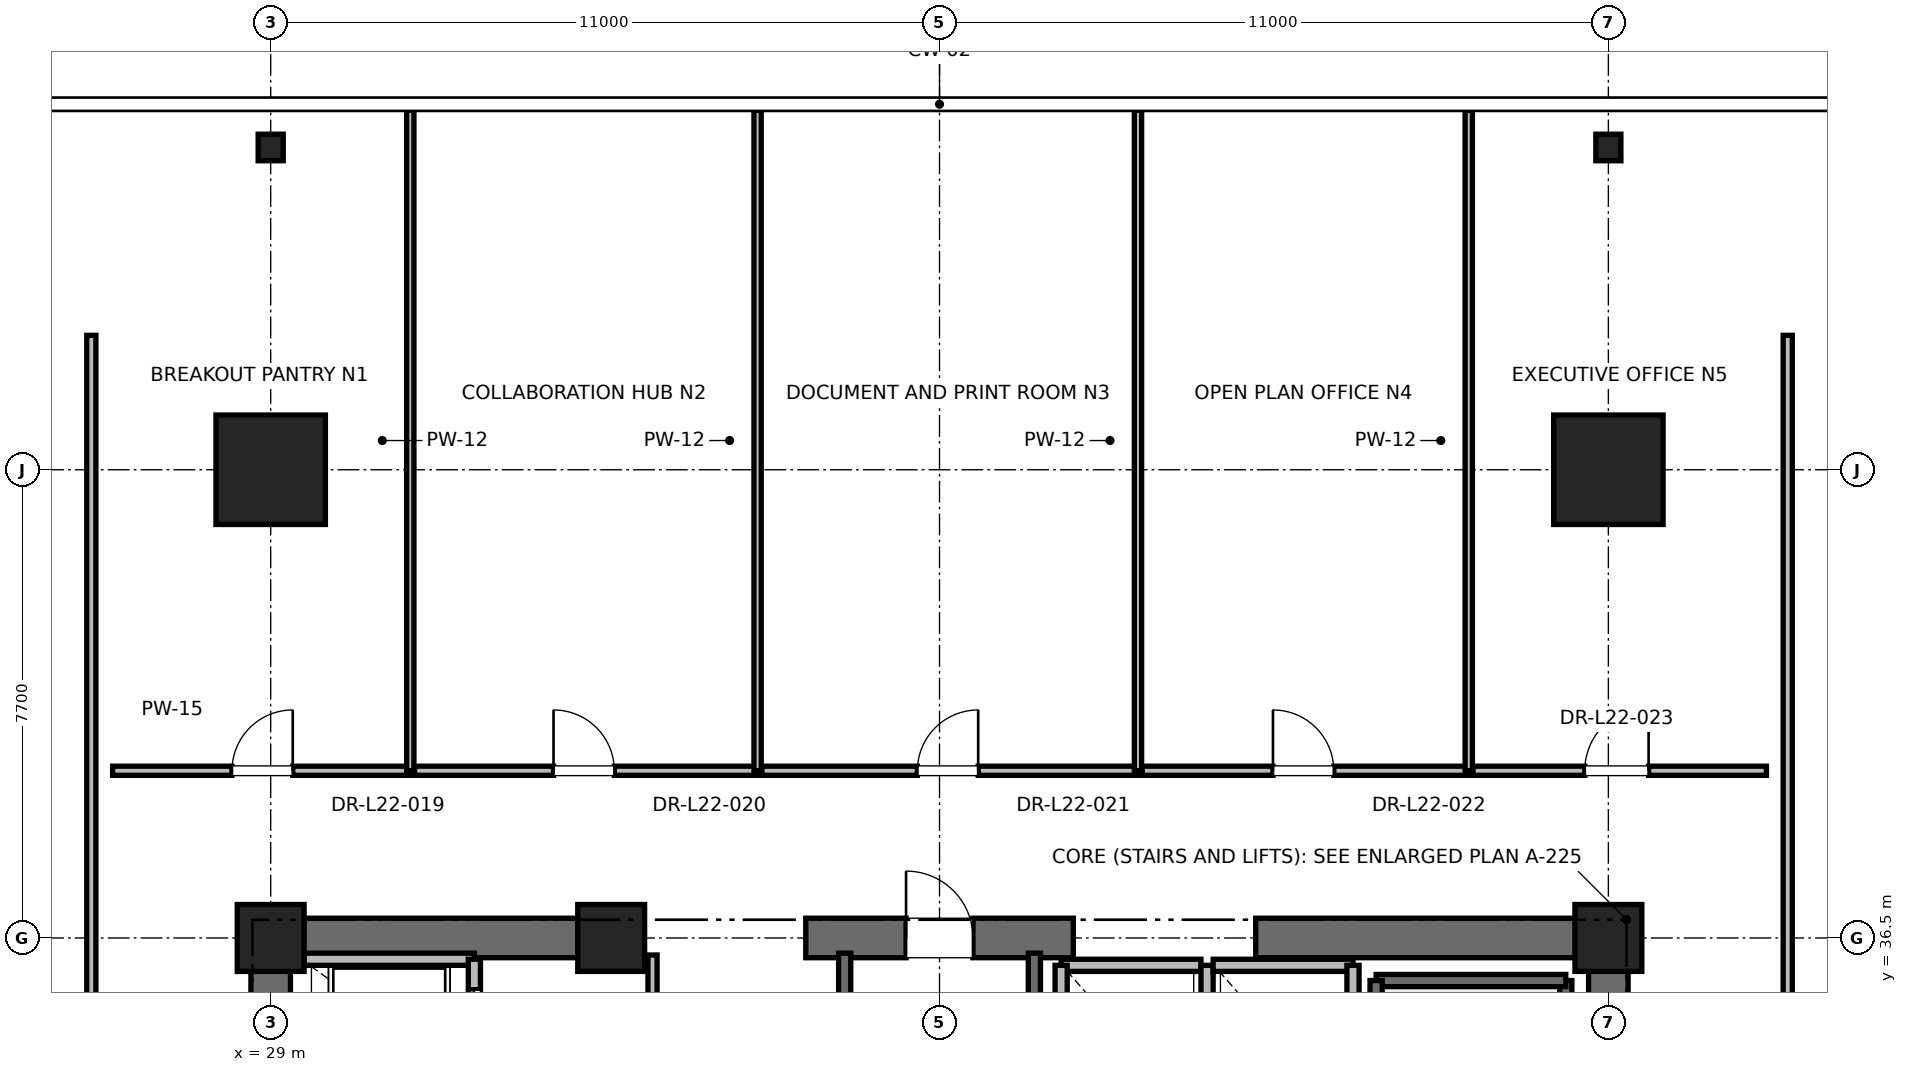
"""IFC4 building model, lengths in metres.
Left out: names, types, materials, properties, quantities, classifications, styles, units other than length and angle.
Written with IfcOpenShell. Run it as: python <this file> out.ifc"""

import sys

from ifc_helpers import new_model, si_unit, direction, frame, frame_2d, origin, origin_2d, place, context, subcontext, project, spatial, rectangle, i_section, extrude, element, fill, save


model = new_model("IFC4")
c1 = context("Model", 3, precision=1e-05, world=origin(), true_north=direction((0.0, 1.0)))
c2 = subcontext(c1, "Body", "Model", "MODEL_VIEW")
j1 = project(units=[si_unit("LENGTHUNIT", "METRE"), si_unit("PLANEANGLEUNIT", "RADIAN")], contexts=[c1])
p1 = place(None, origin())
s1 = spatial("IfcSite", under=j1, at=p1, CompositionType="ELEMENT")
p2 = place(p1, origin())
s2 = spatial("IfcBuilding", under=s1, at=p2, CompositionType="ELEMENT")
p3 = place(p2, frame((0.0, 0.0, 95.6)))
s3 = spatial("IfcBuildingStorey", under=s2, at=p3, CompositionType="ELEMENT", Elevation=95.6)
for number, where, z_axis, x_axis in (
    (1, (29.0, 44.2, 0.0), (0.0, 0.0, 1.0), (1.0, 0.0, 0.0)),
    (2, (51.0, 44.2, 0.0), (0.0, 0.0, 1.0), (1.0, 0.0, 0.0)),
):
    element("IfcColumn", number, at=place(p3, frame(where, z_axis=z_axis, x_axis=x_axis)), inside=s3, PredefinedType="COLUMN", context=c2, shape_type="SweptSolid", body=[
        extrude(rectangle(XDim=1.8, YDim=1.8, at=origin_2d()), origin(), (0.0, 0.0, 1.0), 4.0),
    ])
for number, where, z_axis, x_axis in (
    (3, (29.0, 49.5, 0.0), (0.0, 0.0, 1.0), (1.0, 0.0, 0.0)),
    (4, (51.0, 49.5, 0.0), (0.0, 0.0, 1.0), (1.0, 0.0, 0.0)),
):
    element("IfcColumn", number, at=place(p3, frame(where, z_axis=z_axis, x_axis=x_axis)), inside=s3, PredefinedType="COLUMN", context=c2, shape_type="SweptSolid", body=[
        extrude(i_section(OverallWidth=0.412, OverallDepth=0.437, WebThickness=0.036, FlangeThickness=0.058, FilletRadius=0.015, at=origin_2d()), origin(), (0.0, 0.0, 1.0), 4.0),
    ])
for number, where, z_axis, x_axis in (
    (5, (29.0, 36.5, 0.0), (0.0, 0.0, 1.0), (1.0, 0.0, 0.0)),
    (6, (51.0, 36.5, 0.0), (0.0, 0.0, 1.0), (1.0, 0.0, 0.0)),
    (7, (34.6, 36.5, 0.0), (0.0, 0.0, 1.0), (1.0, 0.0, 0.0)),
):
    element("IfcColumn", number, at=place(p3, frame(where, z_axis=z_axis, x_axis=x_axis)), inside=s3, PredefinedType="PILASTER", context=c2, shape_type="SweptSolid", body=[
        extrude(rectangle(XDim=1.1, YDim=1.1, at=origin_2d()), origin(), (0.0, 0.0, 1.0), 4.0),
    ])
p4 = place(p3, frame((29.0, 36.5, 0.0), z_axis=(0.0, 0.0, 1.0), x_axis=(1.0, 0.0, 0.0)))
e8 = element("IfcWall", 8, at=p4, inside=s3, PredefinedType="SHEAR", context=c2, shape_type="SweptSolid", body=[
    extrude(rectangle(XDim=5.8, YDim=0.65, at=frame_2d((2.9, 0.0))), origin(), (0.0, 0.0, 1.0), 3.76),
])
p5 = place(p3, frame((37.8, 36.5, 0.0), z_axis=(0.0, 0.0, 1.0), x_axis=(1.0, 0.0, 0.0)))
e9 = element("IfcWall", 9, at=p5, inside=s3, PredefinedType="SHEAR", context=c2, shape_type="SweptSolid", body=[
    extrude(rectangle(XDim=4.4, YDim=0.65, at=frame_2d((2.2, 0.0))), origin(), (0.0, 0.0, 1.0), 3.76),
])
p6 = place(p5, frame((1.65, 0.0, 0.0)))
e10 = element("IfcOpeningElement", 10, at=p6, cuts=e9, PredefinedType="OPENING", context=c2, shape_type="SweptSolid", body=[
    extrude(rectangle(XDim=1.1, YDim=2.15, at=frame_2d((0.55, 1.075))), frame((0.0, 0.325, 0.0), z_axis=(0.0, -1.0, 0.0), x_axis=(1.0, 0.0, 0.0)), (0.0, 0.0, 1.0), 0.65),
])
for number, where, z_axis, x_axis in (
    (11, (45.2, 36.5, 0.0), (0.0, 0.0, 1.0), (1.0, 0.0, 0.0)),
    (12, (29.0, 30.7, 0.0), (0.0, 0.0, 1.0), (0.0, 1.0, 0.0)),
):
    element("IfcWall", number, at=place(p3, frame(where, z_axis=z_axis, x_axis=x_axis)), inside=s3, PredefinedType="SHEAR", context=c2, shape_type="SweptSolid", body=[
        extrude(rectangle(XDim=5.8, YDim=0.65, at=frame_2d((2.9, 0.0))), origin(), (0.0, 0.0, 1.0), 3.76),
    ])
p7 = place(p3, frame((51.0, 27.7, 0.0), z_axis=(0.0, 0.0, 1.0), x_axis=(0.0, 1.0, 0.0)))
e13 = element("IfcWall", 13, at=p7, inside=s3, PredefinedType="SHEAR", context=c2, shape_type="SweptSolid", body=[
    extrude(rectangle(XDim=8.8, YDim=0.65, at=frame_2d((4.4, 0.0))), origin(), (0.0, 0.0, 1.0), 3.76),
])
p8 = place(p3, frame((50.3, 27.65, 0.0), z_axis=(0.0, 0.0, 1.0), x_axis=(0.0, 1.0, 0.0)))
e14 = element("IfcWall", 14, at=p8, inside=s3, PredefinedType="SOLIDWALL", context=c2, shape_type="SweptSolid", body=[
    extrude(rectangle(XDim=8.15, YDim=0.2, at=frame_2d((4.075, 0.0))), origin(), (0.0, 0.0, 1.0), 3.76),
])
p9 = place(p3, frame((47.18, 35.8, 0.0), z_axis=(0.0, 0.0, 1.0), x_axis=(1.0, 0.0, 0.0)))
e15 = element("IfcWall", 15, at=p9, inside=s3, PredefinedType="SOLIDWALL", context=c2, shape_type="SweptSolid", body=[
    extrude(rectangle(XDim=3.12, YDim=0.2, at=frame_2d((1.56, 0.0))), origin(), (0.0, 0.0, 1.0), 3.76),
])
p10 = place(p3, frame((47.18, 27.62, 0.0), z_axis=(0.0, 0.0, 1.0), x_axis=(0.0, 1.0, 0.0)))
e16 = element("IfcWall", 16, at=p10, inside=s3, PredefinedType="SOLIDWALL", context=c2, shape_type="SweptSolid", body=[
    extrude(rectangle(XDim=8.18, YDim=0.2, at=frame_2d((4.09, 0.0))), origin(), (0.0, 0.0, 1.0), 3.76),
])
p11 = place(p3, frame((38.44, 27.38, 0.0), z_axis=(0.0, 0.0, 1.0), x_axis=(0.0, 1.0, 0.0)))
e17 = element("IfcWall", 17, at=p11, inside=s3, PredefinedType="SOLIDWALL", context=c2, shape_type="SweptSolid", body=[
    extrude(rectangle(XDim=8.87, YDim=0.2, at=frame_2d((4.435, 0.0))), origin(), (0.0, 0.0, 1.0), 3.76),
])
p12 = place(p3, frame((41.56, 27.68, 0.0), z_axis=(0.0, 0.0, 1.0), x_axis=(0.0, 1.0, 0.0)))
e18 = element("IfcWall", 18, at=p12, inside=s3, PredefinedType="SOLIDWALL", context=c2, shape_type="SweptSolid", body=[
    extrude(rectangle(XDim=8.57, YDim=0.2, at=frame_2d((4.285, 0.0))), origin(), (0.0, 0.0, 1.0), 3.76),
])
p13 = place(p3, frame((32.35, 36.15, 0.0), z_axis=(0.0, 0.0, 1.0), x_axis=(-1.0, 0.0, 0.0)))
e19 = element("IfcWall", 19, at=p13, inside=s3, PredefinedType="SOLIDWALL", context=c2, shape_type="SweptSolid", body=[
    extrude(rectangle(XDim=2.8, YDim=0.2, at=frame_2d((1.4, 0.0))), origin(), (0.0, 0.0, 1.0), 2.889),
])
p14 = place(p3, frame((32.35, 34.05, 0.0), z_axis=(0.0, 0.0, 1.0), x_axis=(0.0, 1.0, 0.0)))
e20 = element("IfcWall", 20, at=p14, inside=s3, PredefinedType="SOLIDWALL", context=c2, shape_type="SweptSolid", body=[
    extrude(rectangle(XDim=2.1, YDim=0.2, at=frame_2d((1.05, 0.0))), origin(), (0.0, 0.0, 1.0), 3.76),
])
p15 = place(p14, frame((0.5, 0.0, 0.0)))
e21 = element("IfcOpeningElement", 21, at=p15, cuts=e20, PredefinedType="OPENING", context=c2, shape_type="SweptSolid", body=[
    extrude(rectangle(XDim=1.1, YDim=2.2, at=frame_2d((0.55, 1.1))), frame((0.0, 0.1, 0.0), z_axis=(0.0, -1.0, 0.0), x_axis=(1.0, 0.0, 0.0)), (0.0, 0.0, 1.0), 0.2),
])
p16 = place(p3, frame((44.3, 36.05, 0.0), z_axis=(0.0, 0.0, 1.0), x_axis=(-1.0, 0.0, 0.0)))
e22 = element("IfcWall", 22, at=p16, inside=s3, PredefinedType="SOLIDWALL", context=c2, shape_type="SweptSolid", body=[
    extrude(rectangle(XDim=2.3, YDim=0.2, at=frame_2d((1.15, 0.0))), origin(), (0.0, 0.0, 1.0), 2.54),
])
for number, where, z_axis, x_axis in (
    (23, (42.0, 36.05, 0.0), (0.0, 0.0, 1.0), (0.0, -1.0, 0.0)),
    (24, (44.4, 33.45, 0.0), (0.0, 0.0, 1.0), (0.0, 1.0, 0.0)),
):
    element("IfcWall", number, at=place(p3, frame(where, z_axis=z_axis, x_axis=x_axis)), inside=s3, PredefinedType="SOLIDWALL", context=c2, shape_type="SweptSolid", body=[
        extrude(rectangle(XDim=2.6, YDim=0.2, at=frame_2d((1.3, 0.0))), origin(), (0.0, 0.0, 1.0), 2.54),
    ])
p17 = place(p3, frame((46.8, 36.05, 0.0), z_axis=(0.0, 0.0, 1.0), x_axis=(-1.0, 0.0, 0.0)))
e25 = element("IfcWall", 25, at=p17, inside=s3, PredefinedType="SOLIDWALL", context=c2, shape_type="SweptSolid", body=[
    extrude(rectangle(XDim=2.3, YDim=0.2, at=frame_2d((1.15, 0.0))), origin(), (0.0, 0.0, 1.0), 2.54),
])
p18 = place(p3, frame((46.8, 33.45, 0.0), z_axis=(0.0, 0.0, 1.0), x_axis=(0.0, 1.0, 0.0)))
e26 = element("IfcWall", 26, at=p18, inside=s3, PredefinedType="SOLIDWALL", context=c2, shape_type="SweptSolid", body=[
    extrude(rectangle(XDim=2.6, YDim=0.2, at=frame_2d((1.3, 0.0))), origin(), (0.0, 0.0, 1.0), 3.76),
])
p19 = place(p3, frame((35.28, 33.95, 0.0), z_axis=(0.0, 0.0, 1.0), x_axis=(0.0, 1.0, 0.0)))
e27 = element("IfcWall", 27, at=p19, inside=s3, PredefinedType="PARTITIONING", context=c2, shape_type="SweptSolid", body=[
    extrude(rectangle(XDim=2.27, YDim=0.15, at=frame_2d((1.135, 0.0))), origin(), (0.0, 0.0, 1.0), 2.54),
])
p20 = place(p19, frame((0.66, 0.0, 0.0)))
e28 = element("IfcOpeningElement", 28, at=p20, cuts=e27, PredefinedType="OPENING", context=c2, shape_type="SweptSolid", body=[
    extrude(rectangle(XDim=0.95, YDim=2.15, at=frame_2d((0.475, 1.075))), frame((0.0, 0.075, 0.0), z_axis=(0.0, -1.0, 0.0), x_axis=(1.0, 0.0, 0.0)), (0.0, 0.0, 1.0), 0.15),
])
p21 = place(p3, frame((26.4, 39.25, 0.0), z_axis=(0.0, 0.0, 1.0), x_axis=(1.0, 0.0, 0.0)))
e29 = element("IfcWall", 29, at=p21, inside=s3, PredefinedType="PARTITIONING", context=c2, shape_type="SweptSolid", body=[
    extrude(rectangle(XDim=4.896, YDim=0.15, at=frame_2d((2.448, 0.0))), origin(), (0.0, 0.0, 1.0), 2.85),
])
p22 = place(p21, frame((1.963, 0.0, 0.0)))
e30 = element("IfcOpeningElement", 30, at=p22, cuts=e29, PredefinedType="OPENING", context=c2, shape_type="SweptSolid", body=[
    extrude(rectangle(XDim=1.0, YDim=2.15, at=frame_2d((0.5, 1.075))), frame((0.0, 0.075, 0.0), z_axis=(0.0, -1.0, 0.0), x_axis=(1.0, 0.0, 0.0)), (0.0, 0.0, 1.0), 0.15),
])
p23 = place(p3, frame((31.296, 39.25, 0.0), z_axis=(0.0, 0.0, 1.0), x_axis=(0.0, 1.0, 0.0)))
e31 = element("IfcWall", 31, at=p23, inside=s3, PredefinedType="PARTITIONING", context=c2, shape_type="SweptSolid", body=[
    extrude(rectangle(XDim=10.861, YDim=0.12, at=frame_2d((5.43, 0.0))), origin(), (0.0, 0.0, 1.0), 2.39),
])
p24 = place(p3, frame((31.366, 39.25, 0.0), z_axis=(0.0, 0.0, 1.0), x_axis=(1.0, 0.0, 0.0)))
e32 = element("IfcWall", 32, at=p24, inside=s3, PredefinedType="PARTITIONING", context=c2, shape_type="SweptSolid", body=[
    extrude(rectangle(XDim=5.642, YDim=0.15, at=frame_2d((2.821, 0.0))), origin(), (0.0, 0.0, 1.0), 2.85),
])
p25 = place(p24, frame((2.286, 0.0, 0.0)))
e33 = element("IfcOpeningElement", 33, at=p25, cuts=e32, PredefinedType="OPENING", context=c2, shape_type="SweptSolid", body=[
    extrude(rectangle(XDim=1.0, YDim=2.15, at=frame_2d((0.5, 1.075))), frame((0.0, 0.075, 0.0), z_axis=(0.0, -1.0, 0.0), x_axis=(1.0, 0.0, 0.0)), (0.0, 0.0, 1.0), 0.15),
])
p26 = place(p3, frame((37.008, 39.25, 0.0), z_axis=(0.0, 0.0, 1.0), x_axis=(0.0, 1.0, 0.0)))
e34 = element("IfcWall", 34, at=p26, inside=s3, PredefinedType="PARTITIONING", context=c2, shape_type="SweptSolid", body=[
    extrude(rectangle(XDim=10.861, YDim=0.12, at=frame_2d((5.43, 0.0))), origin(), (0.0, 0.0, 1.0), 2.39),
])
p27 = place(p3, frame((37.078, 39.25, 0.0), z_axis=(0.0, 0.0, 1.0), x_axis=(1.0, 0.0, 0.0)))
e35 = element("IfcWall", 35, at=p27, inside=s3, PredefinedType="PARTITIONING", context=c2, shape_type="SweptSolid", body=[
    extrude(rectangle(XDim=6.186, YDim=0.15, at=frame_2d((3.093, 0.0))), origin(), (0.0, 0.0, 1.0), 2.85),
])
p28 = place(p27, frame((2.558, 0.0, 0.0)))
e36 = element("IfcOpeningElement", 36, at=p28, cuts=e35, PredefinedType="OPENING", context=c2, shape_type="SweptSolid", body=[
    extrude(rectangle(XDim=1.0, YDim=2.15, at=frame_2d((0.5, 1.075))), frame((0.0, 0.075, 0.0), z_axis=(0.0, -1.0, 0.0), x_axis=(1.0, 0.0, 0.0)), (0.0, 0.0, 1.0), 0.15),
])
p29 = place(p3, frame((43.264, 39.25, 0.0), z_axis=(0.0, 0.0, 1.0), x_axis=(0.0, 1.0, 0.0)))
e37 = element("IfcWall", 37, at=p29, inside=s3, PredefinedType="PARTITIONING", context=c2, shape_type="SweptSolid", body=[
    extrude(rectangle(XDim=10.861, YDim=0.12, at=frame_2d((5.43, 0.0))), origin(), (0.0, 0.0, 1.0), 2.39),
])
p30 = place(p3, frame((43.334, 39.25, 0.0), z_axis=(0.0, 0.0, 1.0), x_axis=(1.0, 0.0, 0.0)))
e38 = element("IfcWall", 38, at=p30, inside=s3, PredefinedType="PARTITIONING", context=c2, shape_type="SweptSolid", body=[
    extrude(rectangle(XDim=5.37, YDim=0.15, at=frame_2d((2.685, 0.0))), origin(), (0.0, 0.0, 1.0), 2.85),
])
p31 = place(p30, frame((2.15, 0.0, 0.0)))
e39 = element("IfcOpeningElement", 39, at=p31, cuts=e38, PredefinedType="OPENING", context=c2, shape_type="SweptSolid", body=[
    extrude(rectangle(XDim=1.0, YDim=2.15, at=frame_2d((0.5, 1.075))), frame((0.0, 0.075, 0.0), z_axis=(0.0, -1.0, 0.0), x_axis=(1.0, 0.0, 0.0)), (0.0, 0.0, 1.0), 0.15),
])
p32 = place(p3, frame((48.704, 39.25, 0.0), z_axis=(0.0, 0.0, 1.0), x_axis=(0.0, 1.0, 0.0)))
e40 = element("IfcWall", 40, at=p32, inside=s3, PredefinedType="PARTITIONING", context=c2, shape_type="SweptSolid", body=[
    extrude(rectangle(XDim=10.861, YDim=0.12, at=frame_2d((5.43, 0.0))), origin(), (0.0, 0.0, 1.0), 2.39),
])
p33 = place(p3, frame((48.774, 39.25, 0.0), z_axis=(0.0, 0.0, 1.0), x_axis=(1.0, 0.0, 0.0)))
e41 = element("IfcWall", 41, at=p33, inside=s3, PredefinedType="PARTITIONING", context=c2, shape_type="SweptSolid", body=[
    extrude(rectangle(XDim=4.826, YDim=0.15, at=frame_2d((2.413, 0.0))), origin(), (0.0, 0.0, 1.0), 2.85),
])
p34 = place(p33, frame((1.838, 0.0, 0.0)))
e42 = element("IfcOpeningElement", 42, at=p34, cuts=e41, PredefinedType="OPENING", context=c2, shape_type="SweptSolid", body=[
    extrude(rectangle(XDim=1.05, YDim=2.2, at=frame_2d((0.525, 1.1))), frame((0.0, 0.075, 0.0), z_axis=(0.0, -1.0, 0.0), x_axis=(1.0, 0.0, 0.0)), (0.0, 0.0, 1.0), 0.15),
])
p35 = place(p3, frame((26.05, 24.544, 0.0), z_axis=(0.0, 0.0, 1.0), x_axis=(0.0, 1.0, 0.0)))
e43 = element("IfcWall", 43, at=p35, inside=s3, PredefinedType="PARTITIONING", context=c2, shape_type="SweptSolid", body=[
    extrude(rectangle(XDim=21.867, YDim=0.15, at=frame_2d((10.933, 0.0))), origin(), (0.0, 0.0, 1.0), 2.85),
])
p36 = place(p35, frame((5.428, 0.0, 0.0)))
e44 = element("IfcOpeningElement", 44, at=p36, cuts=e43, PredefinedType="OPENING", context=c2, shape_type="SweptSolid", body=[
    extrude(rectangle(XDim=1.0, YDim=2.15, at=frame_2d((0.5, 1.075))), frame((0.0, 0.075, 0.0), z_axis=(0.0, -1.0, 0.0), x_axis=(1.0, 0.0, 0.0)), (0.0, 0.0, 1.0), 0.15),
])
p37 = place(p3, frame((53.95, 30.596, 0.0), z_axis=(0.0, 0.0, 1.0), x_axis=(0.0, 1.0, 0.0)))
e45 = element("IfcWall", 45, at=p37, inside=s3, PredefinedType="PARTITIONING", context=c2, shape_type="SweptSolid", body=[
    extrude(rectangle(XDim=15.815, YDim=0.15, at=frame_2d((7.908, 0.0))), origin(), (0.0, 0.0, 1.0), 2.85),
])
p38 = place(p37, frame((2.402, 0.0, 0.0)))
e46 = element("IfcOpeningElement", 46, at=p38, cuts=e45, PredefinedType="OPENING", context=c2, shape_type="SweptSolid", body=[
    extrude(rectangle(XDim=1.0, YDim=2.15, at=frame_2d((0.5, 1.075))), frame((0.0, 0.075, 0.0), z_axis=(0.0, -1.0, 0.0), x_axis=(1.0, 0.0, 0.0)), (0.0, 0.0, 1.0), 0.15),
])
p39 = place(p6, origin())
e47 = element("IfcDoor", 47, at=p39, inside=s3, OperationType="SINGLE_SWING_LEFT", PredefinedType="DOOR", context=c2, shape_type="SweptSolid", body=[
    extrude(rectangle(XDim=1.1, YDim=2.15, at=frame_2d((0.55, 1.075))), frame((0.0, 0.025, 0.0), z_axis=(0.0, -1.0, 0.0), x_axis=(1.0, 0.0, 0.0)), (0.0, 0.0, 1.0), 0.05),
])
fill(e10, e47)
p40 = place(p15, origin())
e48 = element("IfcDoor", 48, at=p40, inside=s3, OperationType="SLIDING_TO_RIGHT", PredefinedType="DOOR", context=c2, shape_type="SweptSolid", body=[
    extrude(rectangle(XDim=1.1, YDim=2.2, at=frame_2d((0.55, 1.1))), frame((0.0, 0.025, 0.0), z_axis=(0.0, -1.0, 0.0), x_axis=(1.0, 0.0, 0.0)), (0.0, 0.0, 1.0), 0.05),
])
fill(e21, e48)
p41 = place(p22, origin())
e49 = element("IfcDoor", 49, at=p41, inside=s3, OperationType="SINGLE_SWING_RIGHT", PredefinedType="DOOR", context=c2, shape_type="SweptSolid", body=[
    extrude(rectangle(XDim=1.0, YDim=2.15, at=frame_2d((0.5, 1.075))), frame((0.0, 0.025, 0.0), z_axis=(0.0, -1.0, 0.0), x_axis=(1.0, 0.0, 0.0)), (0.0, 0.0, 1.0), 0.05),
])
fill(e30, e49)
p42 = place(p25, origin())
e50 = element("IfcDoor", 50, at=p42, inside=s3, OperationType="SINGLE_SWING_LEFT", PredefinedType="DOOR", context=c2, shape_type="SweptSolid", body=[
    extrude(rectangle(XDim=1.0, YDim=2.15, at=frame_2d((0.5, 1.075))), frame((0.0, 0.025, 0.0), z_axis=(0.0, -1.0, 0.0), x_axis=(1.0, 0.0, 0.0)), (0.0, 0.0, 1.0), 0.05),
])
fill(e33, e50)
p43 = place(p28, origin())
e51 = element("IfcDoor", 51, at=p43, inside=s3, OperationType="SINGLE_SWING_RIGHT", PredefinedType="DOOR", context=c2, shape_type="SweptSolid", body=[
    extrude(rectangle(XDim=1.0, YDim=2.15, at=frame_2d((0.5, 1.075))), frame((0.0, 0.025, 0.0), z_axis=(0.0, -1.0, 0.0), x_axis=(1.0, 0.0, 0.0)), (0.0, 0.0, 1.0), 0.05),
])
fill(e36, e51)
p44 = place(p31, origin())
e52 = element("IfcDoor", 52, at=p44, inside=s3, OperationType="SINGLE_SWING_LEFT", PredefinedType="DOOR", context=c2, shape_type="SweptSolid", body=[
    extrude(rectangle(XDim=1.0, YDim=2.15, at=frame_2d((0.5, 1.075))), frame((0.0, 0.025, 0.0), z_axis=(0.0, -1.0, 0.0), x_axis=(1.0, 0.0, 0.0)), (0.0, 0.0, 1.0), 0.05),
])
fill(e39, e52)
p45 = place(p34, origin())
e53 = element("IfcDoor", 53, at=p45, inside=s3, OperationType="SINGLE_SWING_RIGHT", PredefinedType="DOOR", context=c2, shape_type="SweptSolid", body=[
    extrude(rectangle(XDim=1.05, YDim=2.2, at=frame_2d((0.525, 1.1))), frame((0.0, 0.025, 0.0), z_axis=(0.0, -1.0, 0.0), x_axis=(1.0, 0.0, 0.0)), (0.0, 0.0, 1.0), 0.05),
])
fill(e42, e53)
save(model, sys.argv[1])
